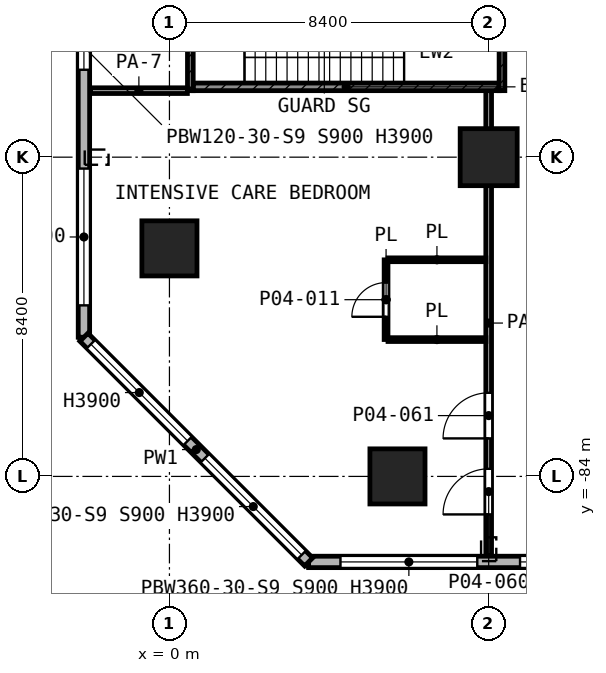
"""IFC4 building model, lengths in metres.
Left out: names, types, materials, properties, quantities, classifications, styles, units other than length and angle.
Written with IfcOpenShell. Run it as: python <this file> out.ifc"""

import sys

from ifc_helpers import new_model, si_unit, direction, frame, frame_2d, origin, origin_2d, place, context, subcontext, project, spatial, rectangle, extrude, element, fill, save


model = new_model("IFC4")
c1 = context("Model", 3, precision=1e-05, world=origin(), true_north=direction((0.0, 1.0)))
c2 = subcontext(c1, "Body", "Model", "MODEL_VIEW")
j1 = project(units=[si_unit("LENGTHUNIT", "METRE"), si_unit("PLANEANGLEUNIT", "RADIAN")], contexts=[c1])
p1 = place(None, origin())
s1 = spatial("IfcSite", under=j1, at=p1, CompositionType="ELEMENT")
p2 = place(p1, origin())
s2 = spatial("IfcBuilding", under=s1, at=p2, CompositionType="ELEMENT")
p3 = place(p2, frame((0.0, 0.0, 18.2)))
s3 = spatial("IfcBuildingStorey", under=s2, at=p3, CompositionType="ELEMENT", Elevation=18.2)
p4 = place(p3, frame((8.4, -75.6, 0.0), z_axis=(0.0, 0.0, 1.0), x_axis=(1.0, 0.0, 0.0)))
e1 = element("IfcColumn", 1, at=p4, inside=s3, PredefinedType="COLUMN", context=c2, shape_type="SweptSolid", body=[
    extrude(rectangle(XDim=1.5, YDim=1.5, at=origin_2d()), origin(), (0.0, 0.0, 1.0), 5.6),
])
for number, where, z_axis, x_axis in (
    (2, (0.0, -78.0, 0.0), (0.0, 0.0, 1.0), (1.0, 0.0, 0.0)),
    (3, (6.0, -84.0, 0.0), (0.0, 0.0, 1.0), (1.0, 0.0, 0.0)),
):
    element("IfcColumn", number, at=place(p3, frame(where, z_axis=z_axis, x_axis=x_axis)), inside=s3, PredefinedType="COLUMN", context=c2, shape_type="SweptSolid", body=[
        extrude(rectangle(XDim=1.45, YDim=1.45, at=origin_2d()), origin(), (0.0, 0.0, 1.0), 5.6),
    ])
p5 = place(p3, frame((-2.25, -3.662, 0.0), z_axis=(0.0, 0.0, 1.0), x_axis=(0.0, -1.0, 0.0)))
e4 = element("IfcWall", 4, at=p5, inside=s3, PredefinedType="SOLIDWALL", context=c2, shape_type="SweptSolid", body=[
    extrude(rectangle(XDim=76.676, YDim=0.3, at=frame_2d((38.338, 0.0))), origin(), (0.0, 0.0, 1.0), 5.05),
])
p6 = place(p5, frame((0.838, 0.0, 0.9)))
e5 = element("IfcOpeningElement", 5, at=p6, cuts=e4, PredefinedType="OPENING", context=c2, shape_type="SweptSolid", body=[
    extrude(rectangle(XDim=3.6, YDim=3.0, at=frame_2d((1.8, 1.5))), frame((0.0, 0.16, 0.0), z_axis=(0.0, -1.0, 0.0), x_axis=(1.0, 0.0, 0.0)), (0.0, 0.0, 1.0), 0.32),
])
p7 = place(p5, frame((5.038, 0.0, 0.9)))
e6 = element("IfcOpeningElement", 6, at=p7, cuts=e4, PredefinedType="OPENING", context=c2, shape_type="SweptSolid", body=[
    extrude(rectangle(XDim=3.6, YDim=3.0, at=frame_2d((1.8, 1.5))), frame((0.0, 0.16, 0.0), z_axis=(0.0, -1.0, 0.0), x_axis=(1.0, 0.0, 0.0)), (0.0, 0.0, 1.0), 0.32),
])
p8 = place(p5, frame((9.238, 0.0, 0.9)))
e7 = element("IfcOpeningElement", 7, at=p8, cuts=e4, PredefinedType="OPENING", context=c2, shape_type="SweptSolid", body=[
    extrude(rectangle(XDim=3.6, YDim=3.0, at=frame_2d((1.8, 1.5))), frame((0.0, 0.16, 0.0), z_axis=(0.0, -1.0, 0.0), x_axis=(1.0, 0.0, 0.0)), (0.0, 0.0, 1.0), 0.32),
])
p9 = place(p5, frame((13.438, 0.0, 0.9)))
e8 = element("IfcOpeningElement", 8, at=p9, cuts=e4, PredefinedType="OPENING", context=c2, shape_type="SweptSolid", body=[
    extrude(rectangle(XDim=3.6, YDim=3.0, at=frame_2d((1.8, 1.5))), frame((0.0, 0.16, 0.0), z_axis=(0.0, -1.0, 0.0), x_axis=(1.0, 0.0, 0.0)), (0.0, 0.0, 1.0), 0.32),
])
p10 = place(p5, frame((17.638, 0.0, 0.9)))
e9 = element("IfcOpeningElement", 9, at=p10, cuts=e4, PredefinedType="OPENING", context=c2, shape_type="SweptSolid", body=[
    extrude(rectangle(XDim=3.6, YDim=3.0, at=frame_2d((1.8, 1.5))), frame((0.0, 0.16, 0.0), z_axis=(0.0, -1.0, 0.0), x_axis=(1.0, 0.0, 0.0)), (0.0, 0.0, 1.0), 0.32),
])
p11 = place(p5, frame((21.838, 0.0, 0.9)))
e10 = element("IfcOpeningElement", 10, at=p11, cuts=e4, PredefinedType="OPENING", context=c2, shape_type="SweptSolid", body=[
    extrude(rectangle(XDim=3.6, YDim=3.0, at=frame_2d((1.8, 1.5))), frame((0.0, 0.16, 0.0), z_axis=(0.0, -1.0, 0.0), x_axis=(1.0, 0.0, 0.0)), (0.0, 0.0, 1.0), 0.32),
])
p12 = place(p5, frame((26.038, 0.0, 0.9)))
e11 = element("IfcOpeningElement", 11, at=p12, cuts=e4, PredefinedType="OPENING", context=c2, shape_type="SweptSolid", body=[
    extrude(rectangle(XDim=3.6, YDim=3.0, at=frame_2d((1.8, 1.5))), frame((0.0, 0.16, 0.0), z_axis=(0.0, -1.0, 0.0), x_axis=(1.0, 0.0, 0.0)), (0.0, 0.0, 1.0), 0.32),
])
p13 = place(p5, frame((30.238, 0.0, 0.9)))
e12 = element("IfcOpeningElement", 12, at=p13, cuts=e4, PredefinedType="OPENING", context=c2, shape_type="SweptSolid", body=[
    extrude(rectangle(XDim=3.6, YDim=3.0, at=frame_2d((1.8, 1.5))), frame((0.0, 0.16, 0.0), z_axis=(0.0, -1.0, 0.0), x_axis=(1.0, 0.0, 0.0)), (0.0, 0.0, 1.0), 0.32),
])
p14 = place(p5, frame((34.438, 0.0, 0.9)))
e13 = element("IfcOpeningElement", 13, at=p14, cuts=e4, PredefinedType="OPENING", context=c2, shape_type="SweptSolid", body=[
    extrude(rectangle(XDim=3.6, YDim=3.0, at=frame_2d((1.8, 1.5))), frame((0.0, 0.16, 0.0), z_axis=(0.0, -1.0, 0.0), x_axis=(1.0, 0.0, 0.0)), (0.0, 0.0, 1.0), 0.32),
])
p15 = place(p5, frame((39.288, 0.0, 0.9)))
e14 = element("IfcOpeningElement", 14, at=p15, cuts=e4, PredefinedType="OPENING", context=c2, shape_type="SweptSolid", body=[
    extrude(rectangle(XDim=2.4, YDim=3.0, at=frame_2d((1.2, 1.5))), frame((0.0, 0.16, 0.0), z_axis=(0.0, -1.0, 0.0), x_axis=(1.0, 0.0, 0.0)), (0.0, 0.0, 1.0), 0.32),
])
p16 = place(p5, frame((42.838, 0.0, 0.9)))
e15 = element("IfcOpeningElement", 15, at=p16, cuts=e4, PredefinedType="OPENING", context=c2, shape_type="SweptSolid", body=[
    extrude(rectangle(XDim=3.6, YDim=3.0, at=frame_2d((1.8, 1.5))), frame((0.0, 0.16, 0.0), z_axis=(0.0, -1.0, 0.0), x_axis=(1.0, 0.0, 0.0)), (0.0, 0.0, 1.0), 0.32),
])
p17 = place(p5, frame((47.038, 0.0, 0.9)))
e16 = element("IfcOpeningElement", 16, at=p17, cuts=e4, PredefinedType="OPENING", context=c2, shape_type="SweptSolid", body=[
    extrude(rectangle(XDim=3.6, YDim=3.0, at=frame_2d((1.8, 1.5))), frame((0.0, 0.16, 0.0), z_axis=(0.0, -1.0, 0.0), x_axis=(1.0, 0.0, 0.0)), (0.0, 0.0, 1.0), 0.32),
])
p18 = place(p5, frame((51.238, 0.0, 0.9)))
e17 = element("IfcOpeningElement", 17, at=p18, cuts=e4, PredefinedType="OPENING", context=c2, shape_type="SweptSolid", body=[
    extrude(rectangle(XDim=3.6, YDim=3.0, at=frame_2d((1.8, 1.5))), frame((0.0, 0.16, 0.0), z_axis=(0.0, -1.0, 0.0), x_axis=(1.0, 0.0, 0.0)), (0.0, 0.0, 1.0), 0.32),
])
p19 = place(p5, frame((55.803, 0.0, 0.9)))
e18 = element("IfcOpeningElement", 18, at=p19, cuts=e4, PredefinedType="OPENING", context=c2, shape_type="SweptSolid", body=[
    extrude(rectangle(XDim=2.4, YDim=3.0, at=frame_2d((1.2, 1.5))), frame((0.0, 0.16, 0.0), z_axis=(0.0, -1.0, 0.0), x_axis=(1.0, 0.0, 0.0)), (0.0, 0.0, 1.0), 0.32),
])
p20 = place(p5, frame((59.638, 0.0, 0.9)))
e19 = element("IfcOpeningElement", 19, at=p20, cuts=e4, PredefinedType="OPENING", context=c2, shape_type="SweptSolid", body=[
    extrude(rectangle(XDim=3.6, YDim=3.0, at=frame_2d((1.8, 1.5))), frame((0.0, 0.16, 0.0), z_axis=(0.0, -1.0, 0.0), x_axis=(1.0, 0.0, 0.0)), (0.0, 0.0, 1.0), 0.32),
])
p21 = place(p5, frame((63.838, 0.0, 0.9)))
e20 = element("IfcOpeningElement", 20, at=p21, cuts=e4, PredefinedType="OPENING", context=c2, shape_type="SweptSolid", body=[
    extrude(rectangle(XDim=3.6, YDim=3.0, at=frame_2d((1.8, 1.5))), frame((0.0, 0.16, 0.0), z_axis=(0.0, -1.0, 0.0), x_axis=(1.0, 0.0, 0.0)), (0.0, 0.0, 1.0), 0.32),
])
p22 = place(p5, frame((68.438, 0.0, 0.9)))
e21 = element("IfcOpeningElement", 21, at=p22, cuts=e4, PredefinedType="OPENING", context=c2, shape_type="SweptSolid", body=[
    extrude(rectangle(XDim=1.2, YDim=3.0, at=frame_2d((0.6, 1.5))), frame((0.0, 0.16, 0.0), z_axis=(0.0, -1.0, 0.0), x_axis=(1.0, 0.0, 0.0)), (0.0, 0.0, 1.0), 0.32),
])
p23 = place(p5, frame((72.238, 0.0, 0.9)))
e22 = element("IfcOpeningElement", 22, at=p23, cuts=e4, PredefinedType="OPENING", context=c2, shape_type="SweptSolid", body=[
    extrude(rectangle(XDim=3.6, YDim=3.0, at=frame_2d((1.8, 1.5))), frame((0.0, 0.16, 0.0), z_axis=(0.0, -1.0, 0.0), x_axis=(1.0, 0.0, 0.0)), (0.0, 0.0, 1.0), 0.32),
])
p24 = place(p3, frame((-2.25, -80.338, 0.0), z_axis=(0.0, 0.0, 1.0), x_axis=(0.707106781187, -0.707106781187, 0.0)))
e23 = element("IfcWall", 23, at=p24, inside=s3, PredefinedType="SOLIDWALL", context=c2, shape_type="SweptSolid", body=[
    extrude(rectangle(XDim=8.361, YDim=0.3, at=frame_2d((4.181, 0.0))), origin(), (0.0, 0.0, 1.0), 5.05),
])
p25 = place(p24, frame((0.259, 0.0, 0.9)))
e24 = element("IfcOpeningElement", 24, at=p25, cuts=e23, PredefinedType="OPENING", context=c2, shape_type="SweptSolid", body=[
    extrude(rectangle(XDim=3.6, YDim=3.0, at=frame_2d((1.8, 1.5))), frame((0.0, 0.16, 0.0), z_axis=(0.0, -1.0, 0.0), x_axis=(1.0, 0.0, 0.0)), (0.0, 0.0, 1.0), 0.32),
])
p26 = place(p24, frame((4.502, 0.0, 0.9)))
e25 = element("IfcOpeningElement", 25, at=p26, cuts=e23, PredefinedType="OPENING", context=c2, shape_type="SweptSolid", body=[
    extrude(rectangle(XDim=3.6, YDim=3.0, at=frame_2d((1.8, 1.5))), frame((0.0, 0.16, 0.0), z_axis=(0.0, -1.0, 0.0), x_axis=(1.0, 0.0, 0.0)), (0.0, 0.0, 1.0), 0.32),
])
p27 = place(p3, frame((3.662, -86.25, 0.0), z_axis=(0.0, 0.0, 1.0), x_axis=(1.0, 0.0, 0.0)))
e26 = element("IfcWall", 26, at=p27, inside=s3, PredefinedType="SOLIDWALL", context=c2, shape_type="SweptSolid", body=[
    extrude(rectangle(XDim=26.276, YDim=0.3, at=frame_2d((13.138, 0.0))), origin(), (0.0, 0.0, 1.0), 5.05),
])
p28 = place(p27, frame((0.838, 0.0, 0.9)))
e27 = element("IfcOpeningElement", 27, at=p28, cuts=e26, PredefinedType="OPENING", context=c2, shape_type="SweptSolid", body=[
    extrude(rectangle(XDim=3.6, YDim=3.0, at=frame_2d((1.8, 1.5))), frame((0.0, 0.16, 0.0), z_axis=(0.0, -1.0, 0.0), x_axis=(1.0, 0.0, 0.0)), (0.0, 0.0, 1.0), 0.32),
])
p29 = place(p27, frame((5.563, 0.0, 0.9)))
e28 = element("IfcOpeningElement", 28, at=p29, cuts=e26, PredefinedType="OPENING", context=c2, shape_type="SweptSolid", body=[
    extrude(rectangle(XDim=1.2, YDim=3.0, at=frame_2d((0.6, 1.5))), frame((0.0, 0.16, 0.0), z_axis=(0.0, -1.0, 0.0), x_axis=(1.0, 0.0, 0.0)), (0.0, 0.0, 1.0), 0.32),
])
p30 = place(p27, frame((9.238, 0.0, 0.9)))
e29 = element("IfcOpeningElement", 29, at=p30, cuts=e26, PredefinedType="OPENING", context=c2, shape_type="SweptSolid", body=[
    extrude(rectangle(XDim=3.6, YDim=3.0, at=frame_2d((1.8, 1.5))), frame((0.0, 0.16, 0.0), z_axis=(0.0, -1.0, 0.0), x_axis=(1.0, 0.0, 0.0)), (0.0, 0.0, 1.0), 0.32),
])
p31 = place(p27, frame((13.438, 0.0, 0.9)))
e30 = element("IfcOpeningElement", 30, at=p31, cuts=e26, PredefinedType="OPENING", context=c2, shape_type="SweptSolid", body=[
    extrude(rectangle(XDim=3.6, YDim=3.0, at=frame_2d((1.8, 1.5))), frame((0.0, 0.16, 0.0), z_axis=(0.0, -1.0, 0.0), x_axis=(1.0, 0.0, 0.0)), (0.0, 0.0, 1.0), 0.32),
])
p32 = place(p27, frame((17.638, 0.0, 0.9)))
e31 = element("IfcOpeningElement", 31, at=p32, cuts=e26, PredefinedType="OPENING", context=c2, shape_type="SweptSolid", body=[
    extrude(rectangle(XDim=3.6, YDim=3.0, at=frame_2d((1.8, 1.5))), frame((0.0, 0.16, 0.0), z_axis=(0.0, -1.0, 0.0), x_axis=(1.0, 0.0, 0.0)), (0.0, 0.0, 1.0), 0.32),
])
p33 = place(p27, frame((21.838, 0.0, 0.9)))
e32 = element("IfcOpeningElement", 32, at=p33, cuts=e26, PredefinedType="OPENING", context=c2, shape_type="SweptSolid", body=[
    extrude(rectangle(XDim=3.6, YDim=3.0, at=frame_2d((1.8, 1.5))), frame((0.0, 0.16, 0.0), z_axis=(0.0, -1.0, 0.0), x_axis=(1.0, 0.0, 0.0)), (0.0, 0.0, 1.0), 0.32),
])
p34 = place(p3, frame((0.55, -73.85, 0.0), z_axis=(0.0, 0.0, 1.0), x_axis=(0.0, 1.0, 0.0)))
e33 = element("IfcWall", 33, at=p34, inside=s3, PredefinedType="SHEAR", context=c2, shape_type="SweptSolid", body=[
    extrude(rectangle(XDim=5.95, YDim=0.15, at=frame_2d((2.975, 0.0))), origin(), (0.0, 0.0, 1.0), 5.05),
])
p35 = place(p3, frame((8.75, -73.85, 0.0), z_axis=(0.0, 0.0, 1.0), x_axis=(0.0, 1.0, 0.0)))
e34 = element("IfcWall", 34, at=p35, inside=s3, PredefinedType="SHEAR", context=c2, shape_type="SweptSolid", body=[
    extrude(rectangle(XDim=5.9, YDim=0.15, at=frame_2d((2.95, 0.0))), origin(), (0.0, 0.0, 1.0), 5.05),
])
p36 = place(p35, frame((3.925, 0.0, 0.0)))
e35 = element("IfcOpeningElement", 35, at=p36, cuts=e34, PredefinedType="OPENING", context=c2, shape_type="SweptSolid", body=[
    extrude(rectangle(XDim=1.1, YDim=2.1, at=frame_2d((0.55, 1.05))), frame((0.0, 0.085, 0.0), z_axis=(0.0, -1.0, 0.0), x_axis=(1.0, 0.0, 0.0)), (0.0, 0.0, 1.0), 0.17),
])
p37 = place(p3, frame((0.625, -73.75, 0.0), z_axis=(0.0, 0.0, 1.0), x_axis=(1.0, 0.0, 0.0)))
e36 = element("IfcWall", 36, at=p37, inside=s3, PredefinedType="SHEAR", context=c2, shape_type="SweptSolid", body=[
    extrude(rectangle(XDim=8.05, YDim=0.2, at=frame_2d((4.025, 0.0))), origin(), (0.0, 0.0, 1.0), 5.05),
])
p38 = place(p3, frame((5.751, -80.4, 0.0), z_axis=(0.0, 0.0, 1.0), x_axis=(1.0, 0.0, 0.0)))
e37 = element("IfcWall", 37, at=p38, inside=s3, PredefinedType="PARTITIONING", context=c2, shape_type="SweptSolid", body=[
    extrude(rectangle(XDim=2.574, YDim=0.1, at=frame_2d((1.287, 0.0))), origin(), (0.0, 0.0, 1.0), 5.05),
])
p39 = place(p3, frame((5.752, -78.3, 0.0), z_axis=(0.0, 0.0, 1.0), x_axis=(1.0, 0.0, 0.0)))
e38 = element("IfcWall", 38, at=p39, inside=s3, PredefinedType="PARTITIONING", context=c2, shape_type="SweptSolid", body=[
    extrude(rectangle(XDim=2.573, YDim=0.1, at=frame_2d((1.287, 0.0))), origin(), (0.0, 0.0, 1.0), 5.05),
])
p40 = place(p3, frame((5.7, -80.398, 0.0), z_axis=(0.0, 0.0, 1.0), x_axis=(0.0, 1.0, 0.0)))
e39 = element("IfcWall", 39, at=p40, inside=s3, PredefinedType="PARTITIONING", context=c2, shape_type="SweptSolid", body=[
    extrude(rectangle(XDim=2.096, YDim=0.1, at=frame_2d((1.048, 0.0))), origin(), (0.0, 0.0, 1.0), 5.05),
])
p41 = place(p40, frame((0.598, 0.0, 0.0)))
e40 = element("IfcOpeningElement", 40, at=p41, cuts=e39, PredefinedType="OPENING", context=c2, shape_type="SweptSolid", body=[
    extrude(rectangle(XDim=0.9, YDim=2.1, at=frame_2d((0.45, 1.05))), frame((0.0, 0.06, 0.0), z_axis=(0.0, -1.0, 0.0), x_axis=(1.0, 0.0, 0.0)), (0.0, 0.0, 1.0), 0.12),
])
p42 = place(p3, frame((-2.08, -73.85, 0.0), z_axis=(0.0, 0.0, 1.0), x_axis=(1.0, 0.0, 0.0)))
e41 = element("IfcWall", 41, at=p42, inside=s3, PredefinedType="PARTITIONING", context=c2, shape_type="SweptSolid", body=[
    extrude(rectangle(XDim=2.552, YDim=0.15, at=frame_2d((1.276, 0.0))), origin(), (0.0, 0.0, 1.0), 3.65),
])
p43 = place(p3, frame((8.4, -86.08, 0.0), z_axis=(0.0, 0.0, 1.0), x_axis=(0.0, 1.0, 0.0)))
e42 = element("IfcWall", 42, at=p43, inside=s3, PredefinedType="PARTITIONING", context=c2, shape_type="SweptSolid", body=[
    extrude(rectangle(XDim=12.23, YDim=0.15, at=frame_2d((6.115, 0.0))), origin(), (0.0, 0.0, 1.0), 3.65),
])
p44 = place(p43, frame((1.08, 0.0, 0.0)))
e43 = element("IfcOpeningElement", 43, at=p44, cuts=e42, PredefinedType="OPENING", context=c2, shape_type="SweptSolid", body=[
    extrude(rectangle(XDim=1.2, YDim=2.1, at=frame_2d((0.6, 1.05))), frame((0.0, 0.085, 0.0), z_axis=(0.0, -1.0, 0.0), x_axis=(1.0, 0.0, 0.0)), (0.0, 0.0, 1.0), 0.17),
])
p45 = place(p43, frame((3.08, 0.0, 0.0)))
e44 = element("IfcOpeningElement", 44, at=p45, cuts=e42, PredefinedType="OPENING", context=c2, shape_type="SweptSolid", body=[
    extrude(rectangle(XDim=1.2, YDim=2.1, at=frame_2d((0.6, 1.05))), frame((0.0, 0.085, 0.0), z_axis=(0.0, -1.0, 0.0), x_axis=(1.0, 0.0, 0.0)), (0.0, 0.0, 1.0), 0.17),
])
p46 = place(p22, origin())
e45 = element("IfcWindow", 45, at=p46, inside=s3, PartitioningType="SINGLE_PANEL", PredefinedType="WINDOW", context=c2, shape_type="SweptSolid", body=[
    extrude(rectangle(XDim=1.2, YDim=3.0, at=frame_2d((0.6, 1.5))), frame((0.0, 0.03, 0.0), z_axis=(0.0, -1.0, 0.0), x_axis=(1.0, 0.0, 0.0)), (0.0, 0.0, 1.0), 0.06),
])
fill(e21, e45)
p47 = place(p23, origin())
e46 = element("IfcWindow", 46, at=p47, inside=s3, PartitioningType="SINGLE_PANEL", PredefinedType="WINDOW", context=c2, shape_type="SweptSolid", body=[
    extrude(rectangle(XDim=3.6, YDim=3.0, at=frame_2d((1.8, 1.5))), frame((0.0, 0.03, 0.0), z_axis=(0.0, -1.0, 0.0), x_axis=(1.0, 0.0, 0.0)), (0.0, 0.0, 1.0), 0.06),
])
fill(e22, e46)
p48 = place(p25, origin())
e47 = element("IfcWindow", 47, at=p48, inside=s3, PartitioningType="SINGLE_PANEL", PredefinedType="WINDOW", context=c2, shape_type="SweptSolid", body=[
    extrude(rectangle(XDim=3.6, YDim=3.0, at=frame_2d((1.8, 1.5))), frame((0.0, 0.03, 0.0), z_axis=(0.0, -1.0, 0.0), x_axis=(1.0, 0.0, 0.0)), (0.0, 0.0, 1.0), 0.06),
])
fill(e24, e47)
p49 = place(p26, origin())
e48 = element("IfcWindow", 48, at=p49, inside=s3, PartitioningType="SINGLE_PANEL", PredefinedType="WINDOW", context=c2, shape_type="SweptSolid", body=[
    extrude(rectangle(XDim=3.6, YDim=3.0, at=frame_2d((1.8, 1.5))), frame((0.0, 0.03, 0.0), z_axis=(0.0, -1.0, 0.0), x_axis=(1.0, 0.0, 0.0)), (0.0, 0.0, 1.0), 0.06),
])
fill(e25, e48)
p50 = place(p28, origin())
e49 = element("IfcWindow", 49, at=p50, inside=s3, PartitioningType="SINGLE_PANEL", PredefinedType="WINDOW", context=c2, shape_type="SweptSolid", body=[
    extrude(rectangle(XDim=3.6, YDim=3.0, at=frame_2d((1.8, 1.5))), frame((0.0, 0.03, 0.0), z_axis=(0.0, -1.0, 0.0), x_axis=(1.0, 0.0, 0.0)), (0.0, 0.0, 1.0), 0.06),
])
fill(e27, e49)
p51 = place(p29, origin())
e50 = element("IfcWindow", 50, at=p51, inside=s3, PartitioningType="SINGLE_PANEL", PredefinedType="WINDOW", context=c2, shape_type="SweptSolid", body=[
    extrude(rectangle(XDim=1.2, YDim=3.0, at=frame_2d((0.6, 1.5))), frame((0.0, 0.03, 0.0), z_axis=(0.0, -1.0, 0.0), x_axis=(1.0, 0.0, 0.0)), (0.0, 0.0, 1.0), 0.06),
])
fill(e28, e50)
p52 = place(p44, origin())
e51 = element("IfcDoor", 51, at=p52, inside=s3, OperationType="SINGLE_SWING_LEFT", PredefinedType="DOOR", context=c2, shape_type="SweptSolid", body=[
    extrude(rectangle(XDim=1.2, YDim=2.1, at=frame_2d((0.6, 1.05))), frame((0.0, 0.025, 0.0), z_axis=(0.0, -1.0, 0.0), x_axis=(1.0, 0.0, 0.0)), (0.0, 0.0, 1.0), 0.05),
])
fill(e43, e51)
p53 = place(p45, origin())
e52 = element("IfcDoor", 52, at=p53, inside=s3, OperationType="SINGLE_SWING_LEFT", PredefinedType="DOOR", context=c2, shape_type="SweptSolid", body=[
    extrude(rectangle(XDim=1.2, YDim=2.1, at=frame_2d((0.6, 1.05))), frame((0.0, 0.025, 0.0), z_axis=(0.0, -1.0, 0.0), x_axis=(1.0, 0.0, 0.0)), (0.0, 0.0, 1.0), 0.05),
])
fill(e44, e52)
p54 = place(p41, origin())
e53 = element("IfcDoor", 53, at=p54, inside=s3, OperationType="SINGLE_SWING_LEFT", PredefinedType="DOOR", context=c2, shape_type="SweptSolid", body=[
    extrude(rectangle(XDim=0.9, YDim=2.1, at=frame_2d((0.45, 1.05))), frame((0.0, 0.025, 0.0), z_axis=(0.0, -1.0, 0.0), x_axis=(1.0, 0.0, 0.0)), (0.0, 0.0, 1.0), 0.05),
])
fill(e40, e53)
save(model, sys.argv[1])
